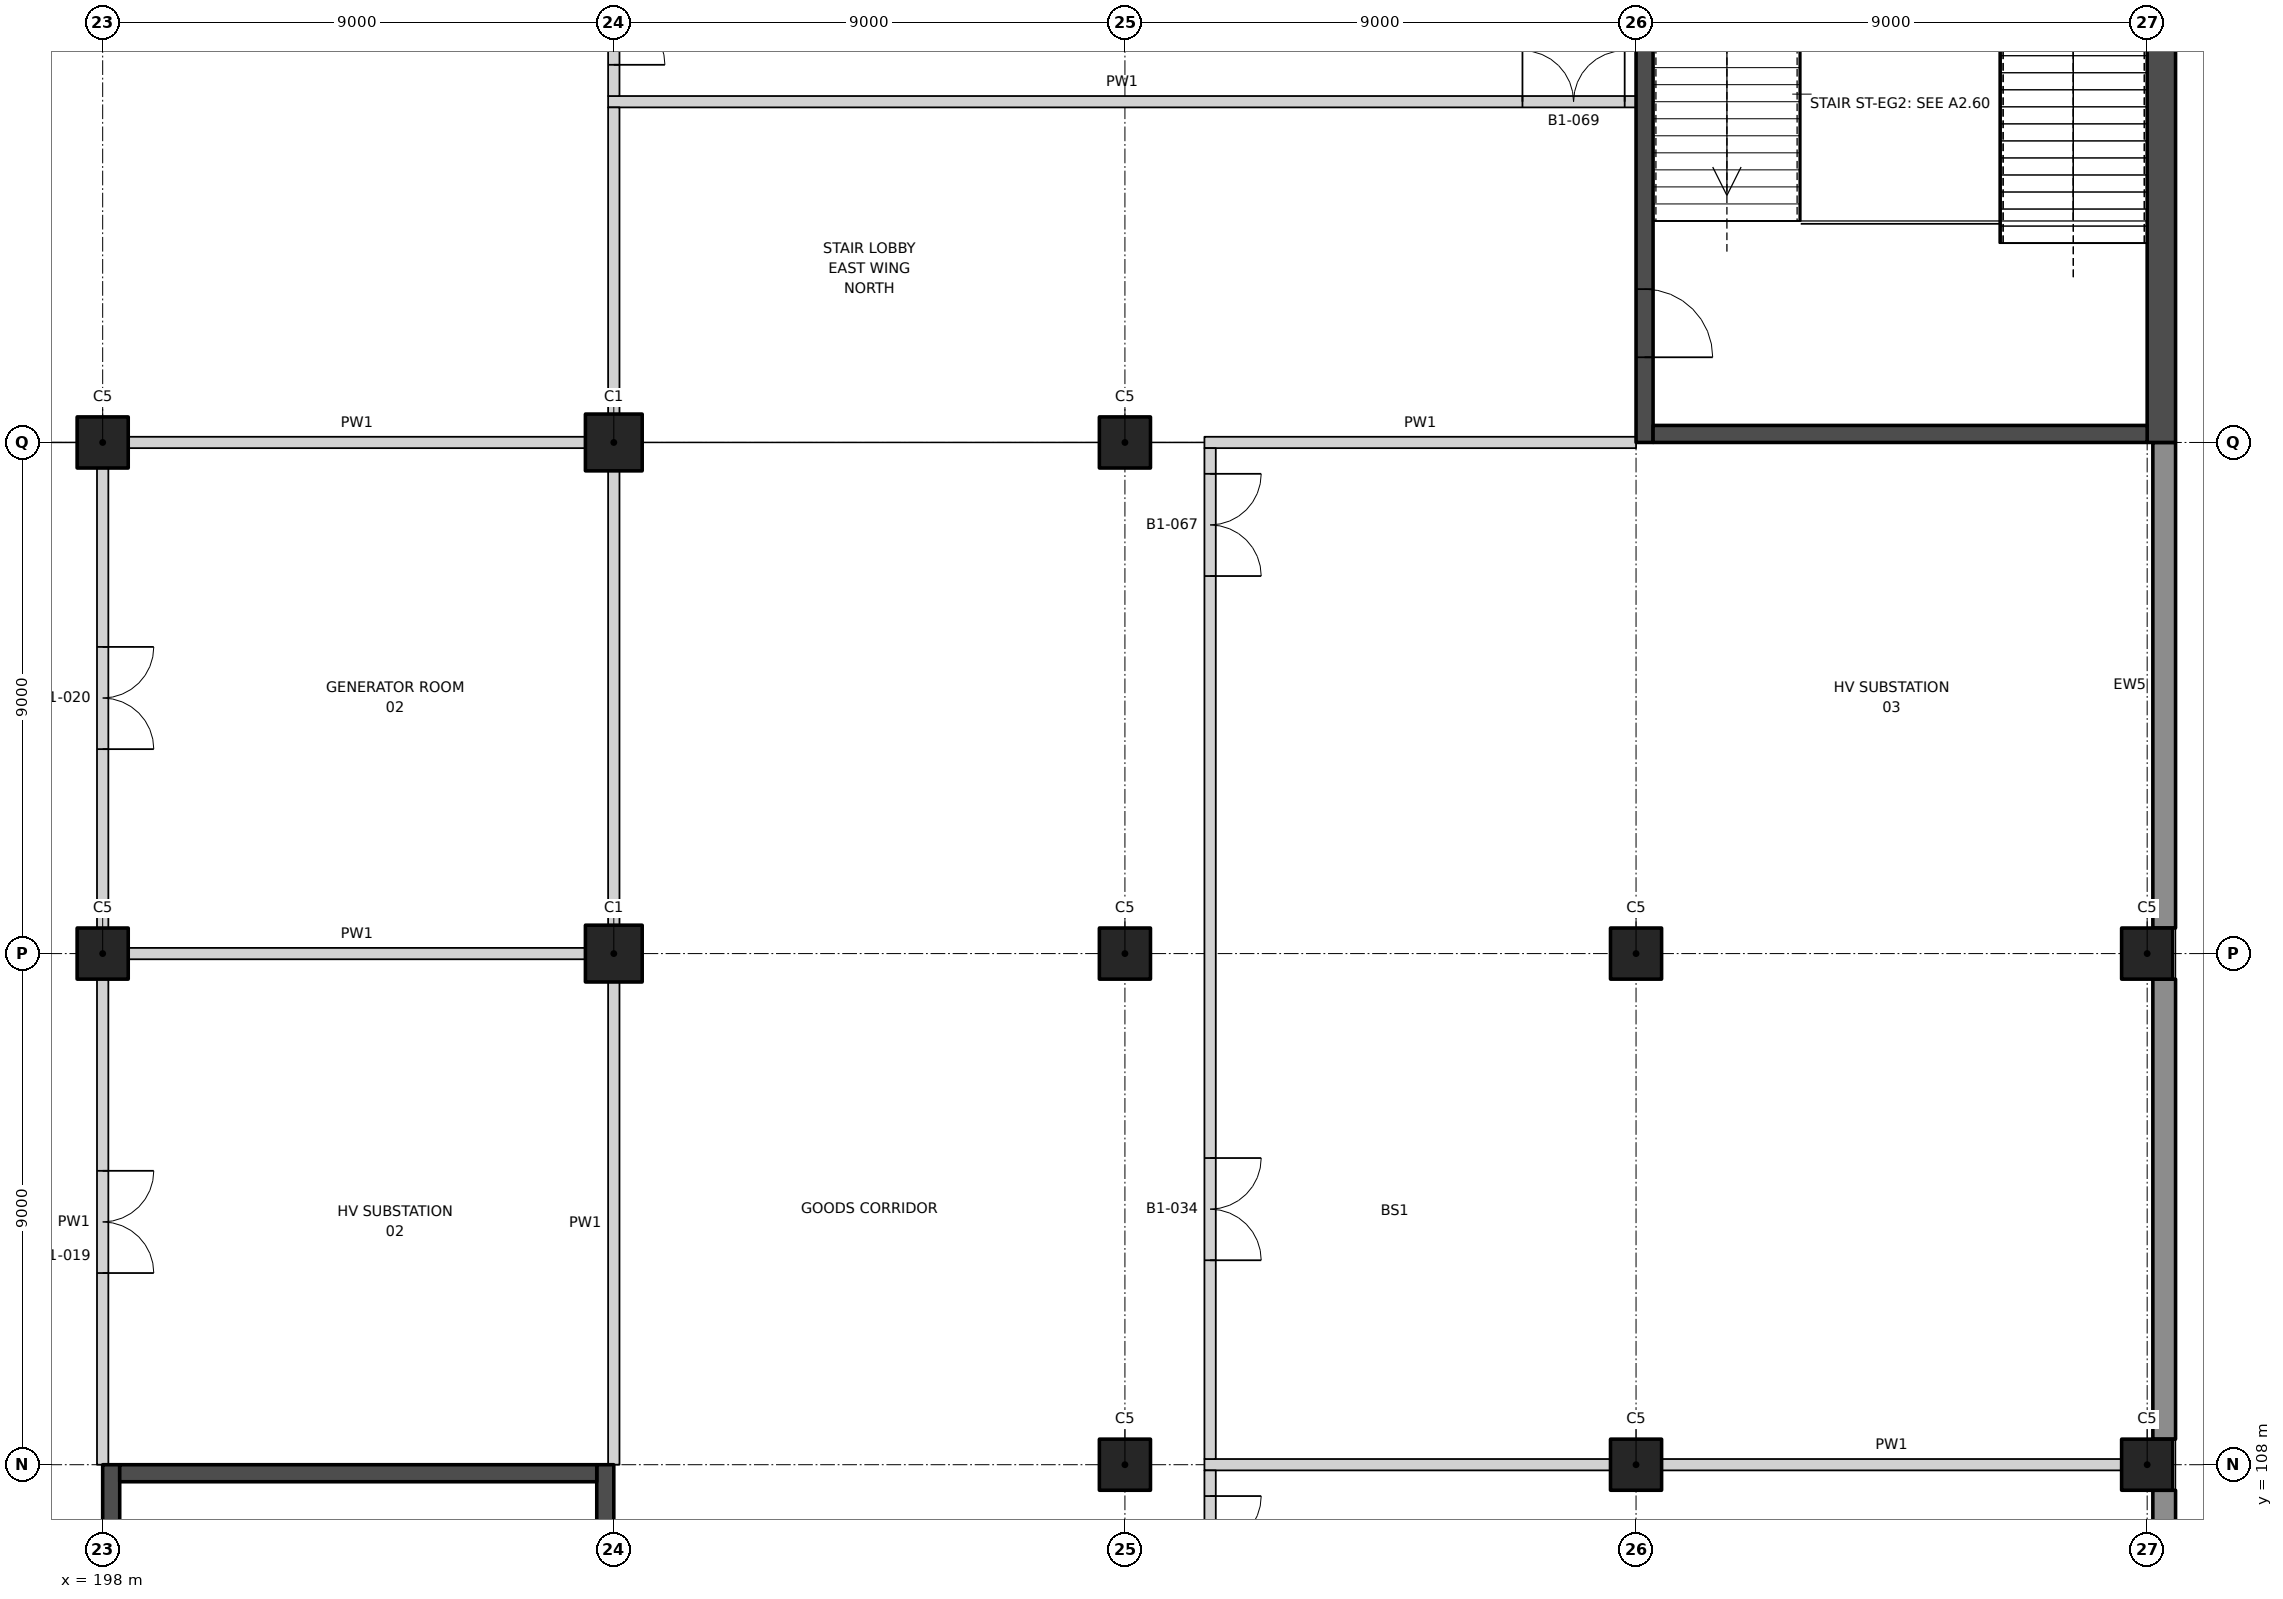
"""IFC4 building model, lengths in metres.
Left out: names, types, materials, properties, quantities, classifications, styles, units other than length and angle.
Written with IfcOpenShell. Run it as: python <this file> out.ifc"""

import sys

from ifc_helpers import new_model, si_unit, direction, frame, frame_2d, origin, origin_2d, place, context, subcontext, project, spatial, rectangle, extrude, element, fill, save


model = new_model("IFC4")
c1 = context("Model", 3, precision=1e-05, world=origin(), true_north=direction((0.0, 1.0)))
c2 = subcontext(c1, "Body", "Model", "MODEL_VIEW")
j1 = project(units=[si_unit("LENGTHUNIT", "METRE"), si_unit("PLANEANGLEUNIT", "RADIAN")], contexts=[c1])
p1 = place(None, origin())
s1 = spatial("IfcSite", under=j1, at=p1, CompositionType="ELEMENT")
p2 = place(p1, origin())
s2 = spatial("IfcBuilding", under=s1, at=p2, CompositionType="ELEMENT")
p3 = place(p2, frame((0.0, 0.0, -6.0)))
s3 = spatial("IfcBuildingStorey", under=s2, at=p3, CompositionType="ELEMENT", Elevation=-6.0)
for number, where, z_axis, x_axis in (
    (1, (207.0, 117.0, 0.0), (0.0, 0.0, 1.0), (1.0, 0.0, 0.0)),
    (2, (207.0, 126.0, 0.0), (0.0, 0.0, 1.0), (1.0, 0.0, 0.0)),
):
    element("IfcColumn", number, at=place(p3, frame(where, z_axis=z_axis, x_axis=x_axis)), inside=s3, PredefinedType="COLUMN", context=c2, shape_type="SweptSolid", body=[
        extrude(rectangle(XDim=1.0, YDim=1.0, at=origin_2d()), origin(), (0.0, 0.0, 1.0), 6.0),
    ])
for number, where, z_axis, x_axis in (
    (3, (198.0, 117.0, 0.0), (0.0, 0.0, 1.0), (1.0, 0.0, 0.0)),
    (4, (198.0, 126.0, 0.0), (0.0, 0.0, 1.0), (1.0, 0.0, 0.0)),
    (5, (216.0, 108.0, 0.0), (0.0, 0.0, 1.0), (1.0, 0.0, 0.0)),
    (6, (216.0, 117.0, 0.0), (0.0, 0.0, 1.0), (1.0, 0.0, 0.0)),
    (7, (216.0, 126.0, 0.0), (0.0, 0.0, 1.0), (1.0, 0.0, 0.0)),
    (8, (225.0, 108.0, 0.0), (0.0, 0.0, 1.0), (1.0, 0.0, 0.0)),
    (9, (225.0, 117.0, 0.0), (0.0, 0.0, 1.0), (1.0, 0.0, 0.0)),
    (10, (234.0, 108.0, 0.0), (0.0, 0.0, 1.0), (1.0, 0.0, 0.0)),
    (11, (234.0, 117.0, 0.0), (0.0, 0.0, 1.0), (1.0, 0.0, 0.0)),
):
    element("IfcColumn", number, at=place(p3, frame(where, z_axis=z_axis, x_axis=x_axis)), inside=s3, PredefinedType="COLUMN", context=c2, shape_type="SweptSolid", body=[
        extrude(rectangle(XDim=0.9, YDim=0.9, at=origin_2d()), origin(), (0.0, 0.0, 1.0), 6.0),
    ])
p4 = place(p3, frame((225.45, 108.0, 0.0), z_axis=(0.0, 0.0, 1.0), x_axis=(1.0, 0.0, 0.0)))
e12 = element("IfcWall", 12, at=p4, inside=s3, PredefinedType="PARTITIONING", context=c2, shape_type="SweptSolid", body=[
    extrude(rectangle(XDim=8.1, YDim=0.2, at=frame_2d((4.05, 0.0))), origin(), (0.0, 0.0, 1.0), 4.65),
])
p5 = place(p3, frame((217.4, 108.0, 0.0), z_axis=(0.0, 0.0, 1.0), x_axis=(1.0, 0.0, 0.0)))
e13 = element("IfcWall", 13, at=p5, inside=s3, PredefinedType="PARTITIONING", context=c2, shape_type="SweptSolid", body=[
    extrude(rectangle(XDim=7.15, YDim=0.2, at=frame_2d((3.575, 0.0))), origin(), (0.0, 0.0, 1.0), 4.65),
])
for number, where, z_axis, x_axis in (
    (14, (198.45, 117.0, 0.0), (0.0, 0.0, 1.0), (1.0, 0.0, 0.0)),
    (15, (198.45, 126.0, 0.0), (0.0, 0.0, 1.0), (1.0, 0.0, 0.0)),
):
    element("IfcWall", number, at=place(p3, frame(where, z_axis=z_axis, x_axis=x_axis)), inside=s3, PredefinedType="PARTITIONING", context=c2, shape_type="SweptSolid", body=[
        extrude(rectangle(XDim=8.05, YDim=0.2, at=frame_2d((4.025, 0.0))), origin(), (0.0, 0.0, 1.0), 4.65),
    ])
p6 = place(p3, frame((217.4, 126.0, 0.0), z_axis=(0.0, 0.0, 1.0), x_axis=(1.0, 0.0, 0.0)))
e16 = element("IfcWall", 16, at=p6, inside=s3, PredefinedType="PARTITIONING", context=c2, shape_type="SweptSolid", body=[
    extrude(rectangle(XDim=7.6, YDim=0.2, at=frame_2d((3.8, 0.0))), origin(), (0.0, 0.0, 1.0), 4.65),
])
p7 = place(p3, frame((206.9, 132.0, 0.0), z_axis=(0.0, 0.0, 1.0), x_axis=(1.0, 0.0, 0.0)))
e17 = element("IfcWall", 17, at=p7, inside=s3, PredefinedType="PARTITIONING", context=c2, shape_type="SweptSolid", body=[
    extrude(rectangle(XDim=18.1, YDim=0.2, at=frame_2d((9.05, 0.0))), origin(), (0.0, 0.0, 1.0), 6.0),
])
p8 = place(p7, frame((16.1, 0.0, 0.0)))
e18 = element("IfcOpeningElement", 18, at=p8, cuts=e17, PredefinedType="OPENING", context=c2, shape_type="SweptSolid", body=[
    extrude(rectangle(XDim=1.8, YDim=2.1, at=frame_2d((0.9, 1.05))), frame((0.0, 0.11, 0.0), z_axis=(0.0, -1.0, 0.0), x_axis=(1.0, 0.0, 0.0)), (0.0, 0.0, 1.0), 0.22),
])
p9 = place(p3, frame((198.0, 108.0, 0.0), z_axis=(0.0, 0.0, 1.0), x_axis=(0.0, 1.0, 0.0)))
e19 = element("IfcWall", 19, at=p9, inside=s3, PredefinedType="PARTITIONING", context=c2, shape_type="SweptSolid", body=[
    extrude(rectangle(XDim=8.55, YDim=0.2, at=frame_2d((4.275, 0.0))), origin(), (0.0, 0.0, 1.0), 4.55),
])
p10 = place(p9, frame((3.375, 0.0, 0.0)))
e20 = element("IfcOpeningElement", 20, at=p10, cuts=e19, PredefinedType="OPENING", context=c2, shape_type="SweptSolid", body=[
    extrude(rectangle(XDim=1.8, YDim=2.1, at=frame_2d((0.9, 1.05))), frame((0.0, 0.11, 0.0), z_axis=(0.0, -1.0, 0.0), x_axis=(1.0, 0.0, 0.0)), (0.0, 0.0, 1.0), 0.22),
])
p11 = place(p3, frame((198.0, 117.45, 0.0), z_axis=(0.0, 0.0, 1.0), x_axis=(0.0, 1.0, 0.0)))
e21 = element("IfcWall", 21, at=p11, inside=s3, PredefinedType="PARTITIONING", context=c2, shape_type="SweptSolid", body=[
    extrude(rectangle(XDim=8.1, YDim=0.2, at=frame_2d((4.05, 0.0))), origin(), (0.0, 0.0, 1.0), 4.65),
])
p12 = place(p11, frame((3.15, 0.0, 0.0)))
e22 = element("IfcOpeningElement", 22, at=p12, cuts=e21, PredefinedType="OPENING", context=c2, shape_type="SweptSolid", body=[
    extrude(rectangle(XDim=1.8, YDim=2.1, at=frame_2d((0.9, 1.05))), frame((0.0, 0.11, 0.0), z_axis=(0.0, -1.0, 0.0), x_axis=(1.0, 0.0, 0.0)), (0.0, 0.0, 1.0), 0.22),
])
p13 = place(p3, frame((207.0, 108.0, 0.0), z_axis=(0.0, 0.0, 1.0), x_axis=(0.0, 1.0, 0.0)))
e23 = element("IfcWall", 23, at=p13, inside=s3, PredefinedType="PARTITIONING", context=c2, shape_type="SweptSolid", body=[
    extrude(rectangle(XDim=8.5, YDim=0.2, at=frame_2d((4.25, 0.0))), origin(), (0.0, 0.0, 1.0), 4.65),
])
p14 = place(p3, frame((207.0, 117.5, 0.0), z_axis=(0.0, 0.0, 1.0), x_axis=(0.0, 1.0, 0.0)))
e24 = element("IfcWall", 24, at=p14, inside=s3, PredefinedType="PARTITIONING", context=c2, shape_type="SweptSolid", body=[
    extrude(rectangle(XDim=8.0, YDim=0.2, at=frame_2d((4.0, 0.0))), origin(), (0.0, 0.0, 1.0), 4.65),
])
p15 = place(p3, frame((207.0, 126.5, 0.0), z_axis=(0.0, 0.0, 1.0), x_axis=(0.0, 1.0, 0.0)))
e25 = element("IfcWall", 25, at=p15, inside=s3, PredefinedType="PARTITIONING", context=c2, shape_type="SweptSolid", body=[
    extrude(rectangle(XDim=5.4, YDim=0.2, at=frame_2d((2.7, 0.0))), origin(), (0.0, 0.0, 1.0), 4.65),
])
p16 = place(p3, frame((207.0, 132.1, 0.0), z_axis=(0.0, 0.0, 1.0), x_axis=(0.0, 1.0, 0.0)))
e26 = element("IfcWall", 26, at=p16, inside=s3, PredefinedType="PARTITIONING", context=c2, shape_type="SweptSolid", body=[
    extrude(rectangle(XDim=2.9, YDim=0.2, at=frame_2d((1.45, 0.0))), origin(), (0.0, 0.0, 1.0), 4.65),
])
p17 = place(p16, frame((0.55, 0.0, 0.0)))
e27 = element("IfcOpeningElement", 27, at=p17, cuts=e26, PredefinedType="OPENING", context=c2, shape_type="SweptSolid", body=[
    extrude(rectangle(XDim=1.8, YDim=2.1, at=frame_2d((0.9, 1.05))), frame((0.0, 0.11, 0.0), z_axis=(0.0, -1.0, 0.0), x_axis=(1.0, 0.0, 0.0)), (0.0, 0.0, 1.0), 0.22),
])
p18 = place(p3, frame((217.5, 90.1, 0.0), z_axis=(0.0, 0.0, 1.0), x_axis=(0.0, 1.0, 0.0)))
e28 = element("IfcWall", 28, at=p18, inside=s3, PredefinedType="PARTITIONING", context=c2, shape_type="SweptSolid", body=[
    extrude(rectangle(XDim=17.8, YDim=0.2, at=frame_2d((8.9, 0.0))), origin(), (0.0, 0.0, 1.0), 6.0),
])
p19 = place(p18, frame((3.5, 0.0, 0.0)))
e29 = element("IfcOpeningElement", 29, at=p19, cuts=e28, PredefinedType="OPENING", context=c2, shape_type="SweptSolid", body=[
    extrude(rectangle(XDim=1.8, YDim=2.1, at=frame_2d((0.9, 1.05))), frame((0.0, 0.11, 0.0), z_axis=(0.0, -1.0, 0.0), x_axis=(1.0, 0.0, 0.0)), (0.0, 0.0, 1.0), 0.22),
])
p20 = place(p18, frame((15.548, 0.0, 0.0)))
e30 = element("IfcOpeningElement", 30, at=p20, cuts=e28, PredefinedType="OPENING", context=c2, shape_type="SweptSolid", body=[
    extrude(rectangle(XDim=1.8, YDim=2.1, at=frame_2d((0.9, 1.05))), frame((0.0, 0.11, 0.0), z_axis=(0.0, -1.0, 0.0), x_axis=(1.0, 0.0, 0.0)), (0.0, 0.0, 1.0), 0.22),
])
p21 = place(p3, frame((217.5, 108.1, 0.0), z_axis=(0.0, 0.0, 1.0), x_axis=(0.0, 1.0, 0.0)))
e31 = element("IfcWall", 31, at=p21, inside=s3, PredefinedType="PARTITIONING", context=c2, shape_type="SweptSolid", body=[
    extrude(rectangle(XDim=17.8, YDim=0.2, at=frame_2d((8.9, 0.0))), origin(), (0.0, 0.0, 1.0), 6.0),
])
p22 = place(p21, frame((3.5, 0.0, 0.0)))
e32 = element("IfcOpeningElement", 32, at=p22, cuts=e31, PredefinedType="OPENING", context=c2, shape_type="SweptSolid", body=[
    extrude(rectangle(XDim=1.8, YDim=2.1, at=frame_2d((0.9, 1.05))), frame((0.0, 0.11, 0.0), z_axis=(0.0, -1.0, 0.0), x_axis=(1.0, 0.0, 0.0)), (0.0, 0.0, 1.0), 0.22),
])
p23 = place(p21, frame((15.548, 0.0, 0.0)))
e33 = element("IfcOpeningElement", 33, at=p23, cuts=e31, PredefinedType="OPENING", context=c2, shape_type="SweptSolid", body=[
    extrude(rectangle(XDim=1.8, YDim=2.1, at=frame_2d((0.9, 1.05))), frame((0.0, 0.11, 0.0), z_axis=(0.0, -1.0, 0.0), x_axis=(1.0, 0.0, 0.0)), (0.0, 0.0, 1.0), 0.22),
])
for number, where, z_axis, x_axis in (
    (34, (234.3, 99.45, 0.0), (0.0, 0.0, 1.0), (0.0, 1.0, 0.0)),
    (35, (234.3, 108.45, 0.0), (0.0, 0.0, 1.0), (0.0, 1.0, 0.0)),
):
    element("IfcWall", number, at=place(p3, frame(where, z_axis=z_axis, x_axis=x_axis)), inside=s3, PredefinedType="SOLIDWALL", context=c2, shape_type="SweptSolid", body=[
        extrude(rectangle(XDim=8.1, YDim=0.4, at=frame_2d((4.05, 0.0))), origin(), (0.0, 0.0, 1.0), 6.0),
    ])
p24 = place(p3, frame((234.3, 117.45, 0.0), z_axis=(0.0, 0.0, 1.0), x_axis=(0.0, 1.0, 0.0)))
e36 = element("IfcWall", 36, at=p24, inside=s3, PredefinedType="SOLIDWALL", context=c2, shape_type="SweptSolid", body=[
    extrude(rectangle(XDim=8.55, YDim=0.4, at=frame_2d((4.275, 0.0))), origin(), (0.0, 0.0, 1.0), 6.0),
])
p25 = place(p3, frame((198.15, 108.0, 0.0), z_axis=(0.0, 0.0, 1.0), x_axis=(0.0, -1.0, 0.0)))
e37 = element("IfcWall", 37, at=p25, inside=s3, PredefinedType="SHEAR", context=c2, shape_type="SweptSolid", body=[
    extrude(rectangle(XDim=18.0, YDim=0.3, at=frame_2d((9.0, 0.0))), origin(), (0.0, 0.0, 1.0), 6.0),
])
p26 = place(p25, frame((8.6, 0.0, 0.0)))
e38 = element("IfcOpeningElement", 38, at=p26, cuts=e37, PredefinedType="OPENING", context=c2, shape_type="SweptSolid", body=[
    extrude(rectangle(XDim=1.2, YDim=2.1, at=frame_2d((0.6, 1.05))), frame((0.0, 0.16, 0.0), z_axis=(0.0, -1.0, 0.0), x_axis=(1.0, 0.0, 0.0)), (0.0, 0.0, 1.0), 0.32),
])
p27 = place(p3, frame((206.85, 108.0, 0.0), z_axis=(0.0, 0.0, 1.0), x_axis=(0.0, -1.0, 0.0)))
e39 = element("IfcWall", 39, at=p27, inside=s3, PredefinedType="SHEAR", context=c2, shape_type="SweptSolid", body=[
    extrude(rectangle(XDim=18.0, YDim=0.3, at=frame_2d((9.0, 0.0))), origin(), (0.0, 0.0, 1.0), 6.0),
])
p28 = place(p3, frame((198.3, 107.85, 0.0), z_axis=(0.0, 0.0, 1.0), x_axis=(1.0, 0.0, 0.0)))
e40 = element("IfcWall", 40, at=p28, inside=s3, PredefinedType="SHEAR", context=c2, shape_type="SweptSolid", body=[
    extrude(rectangle(XDim=8.4, YDim=0.3, at=frame_2d((4.2, 0.0))), origin(), (0.0, 0.0, 1.0), 6.0),
])
p29 = place(p3, frame((225.15, 126.0, 0.0), z_axis=(0.0, 0.0, 1.0), x_axis=(0.0, 1.0, 0.0)))
e41 = element("IfcWall", 41, at=p29, inside=s3, PredefinedType="SHEAR", context=c2, shape_type="SweptSolid", body=[
    extrude(rectangle(XDim=18.0, YDim=0.3, at=frame_2d((9.0, 0.0))), origin(), (0.0, 0.0, 1.0), 6.0),
])
p30 = place(p29, frame((1.5, 0.0, 0.0)))
e42 = element("IfcOpeningElement", 42, at=p30, cuts=e41, PredefinedType="OPENING", context=c2, shape_type="SweptSolid", body=[
    extrude(rectangle(XDim=1.2, YDim=2.1, at=frame_2d((0.6, 1.05))), frame((0.0, 0.16, 0.0), z_axis=(0.0, -1.0, 0.0), x_axis=(1.0, 0.0, 0.0)), (0.0, 0.0, 1.0), 0.32),
])
p31 = place(p3, frame((234.25, 126.0, 0.0), z_axis=(0.0, 0.0, 1.0), x_axis=(0.0, 1.0, 0.0)))
e43 = element("IfcWall", 43, at=p31, inside=s3, PredefinedType="SHEAR", context=c2, shape_type="SweptSolid", body=[
    extrude(rectangle(XDim=18.5, YDim=0.5, at=frame_2d((9.25, 0.0))), origin(), (0.0, 0.0, 1.0), 6.0),
])
p32 = place(p3, frame((225.3, 126.15, 0.0), z_axis=(0.0, 0.0, 1.0), x_axis=(1.0, 0.0, 0.0)))
e44 = element("IfcWall", 44, at=p32, inside=s3, PredefinedType="SHEAR", context=c2, shape_type="SweptSolid", body=[
    extrude(rectangle(XDim=8.7, YDim=0.3, at=frame_2d((4.35, 0.0))), origin(), (0.0, 0.0, 1.0), 6.0),
])
p33 = place(p10, frame((1.8, 0.0, 0.0), z_axis=(0.0, 0.0, 1.0), x_axis=(-1.0, 0.0, 0.0)))
e45 = element("IfcDoor", 45, at=p33, inside=s3, OperationType="DOUBLE_DOOR_DOUBLE_SWING", PredefinedType="DOOR", context=c2, shape_type="SweptSolid", body=[
    extrude(rectangle(XDim=1.8, YDim=2.1, at=frame_2d((0.9, 1.05))), frame((0.0, 0.025, 0.0), z_axis=(0.0, -1.0, 0.0), x_axis=(1.0, 0.0, 0.0)), (0.0, 0.0, 1.0), 0.05),
])
fill(e20, e45)
p34 = place(p12, frame((1.8, 0.0, 0.0), z_axis=(0.0, 0.0, 1.0), x_axis=(-1.0, 0.0, 0.0)))
e46 = element("IfcDoor", 46, at=p34, inside=s3, OperationType="DOUBLE_DOOR_DOUBLE_SWING", PredefinedType="DOOR", context=c2, shape_type="SweptSolid", body=[
    extrude(rectangle(XDim=1.8, YDim=2.1, at=frame_2d((0.9, 1.05))), frame((0.0, 0.025, 0.0), z_axis=(0.0, -1.0, 0.0), x_axis=(1.0, 0.0, 0.0)), (0.0, 0.0, 1.0), 0.05),
])
fill(e22, e46)
p35 = place(p22, frame((1.8, 0.0, 0.0), z_axis=(0.0, 0.0, 1.0), x_axis=(-1.0, 0.0, 0.0)))
e47 = element("IfcDoor", 47, at=p35, inside=s3, OperationType="DOUBLE_DOOR_DOUBLE_SWING", PredefinedType="DOOR", context=c2, shape_type="SweptSolid", body=[
    extrude(rectangle(XDim=1.8, YDim=2.1, at=frame_2d((0.9, 1.05))), frame((0.0, 0.025, 0.0), z_axis=(0.0, -1.0, 0.0), x_axis=(1.0, 0.0, 0.0)), (0.0, 0.0, 1.0), 0.05),
])
fill(e32, e47)
p36 = place(p17, frame((1.8, 0.0, 0.0), z_axis=(0.0, 0.0, 1.0), x_axis=(-1.0, 0.0, 0.0)))
e48 = element("IfcDoor", 48, at=p36, inside=s3, OperationType="DOUBLE_DOOR_DOUBLE_SWING", PredefinedType="DOOR", context=c2, shape_type="SweptSolid", body=[
    extrude(rectangle(XDim=1.8, YDim=2.1, at=frame_2d((0.9, 1.05))), frame((0.0, 0.025, 0.0), z_axis=(0.0, -1.0, 0.0), x_axis=(1.0, 0.0, 0.0)), (0.0, 0.0, 1.0), 0.05),
])
fill(e27, e48)
p37 = place(p20, frame((1.8, 0.0, 0.0), z_axis=(0.0, 0.0, 1.0), x_axis=(-1.0, 0.0, 0.0)))
e49 = element("IfcDoor", 49, at=p37, inside=s3, OperationType="DOUBLE_DOOR_DOUBLE_SWING", PredefinedType="DOOR", context=c2, shape_type="SweptSolid", body=[
    extrude(rectangle(XDim=1.8, YDim=2.1, at=frame_2d((0.9, 1.05))), frame((0.0, 0.025, 0.0), z_axis=(0.0, -1.0, 0.0), x_axis=(1.0, 0.0, 0.0)), (0.0, 0.0, 1.0), 0.05),
])
fill(e30, e49)
p38 = place(p23, frame((1.8, 0.0, 0.0), z_axis=(0.0, 0.0, 1.0), x_axis=(-1.0, 0.0, 0.0)))
e50 = element("IfcDoor", 50, at=p38, inside=s3, OperationType="DOUBLE_DOOR_DOUBLE_SWING", PredefinedType="DOOR", context=c2, shape_type="SweptSolid", body=[
    extrude(rectangle(XDim=1.8, YDim=2.1, at=frame_2d((0.9, 1.05))), frame((0.0, 0.025, 0.0), z_axis=(0.0, -1.0, 0.0), x_axis=(1.0, 0.0, 0.0)), (0.0, 0.0, 1.0), 0.05),
])
fill(e33, e50)
p39 = place(p8, origin())
e51 = element("IfcDoor", 51, at=p39, inside=s3, OperationType="DOUBLE_DOOR_DOUBLE_SWING", PredefinedType="DOOR", context=c2, shape_type="SweptSolid", body=[
    extrude(rectangle(XDim=1.8, YDim=2.1, at=frame_2d((0.9, 1.05))), frame((0.0, 0.025, 0.0), z_axis=(0.0, -1.0, 0.0), x_axis=(1.0, 0.0, 0.0)), (0.0, 0.0, 1.0), 0.05),
])
fill(e18, e51)
p40 = place(p30, frame((1.2, 0.0, 0.0), z_axis=(0.0, 0.0, 1.0), x_axis=(-1.0, 0.0, 0.0)))
e52 = element("IfcDoor", 52, at=p40, inside=s3, OperationType="SINGLE_SWING_RIGHT", PredefinedType="DOOR", context=c2, shape_type="SweptSolid", body=[
    extrude(rectangle(XDim=1.2, YDim=2.1, at=frame_2d((0.6, 1.05))), frame((0.0, 0.025, 0.0), z_axis=(0.0, -1.0, 0.0), x_axis=(1.0, 0.0, 0.0)), (0.0, 0.0, 1.0), 0.05),
])
fill(e42, e52)
save(model, sys.argv[1])
